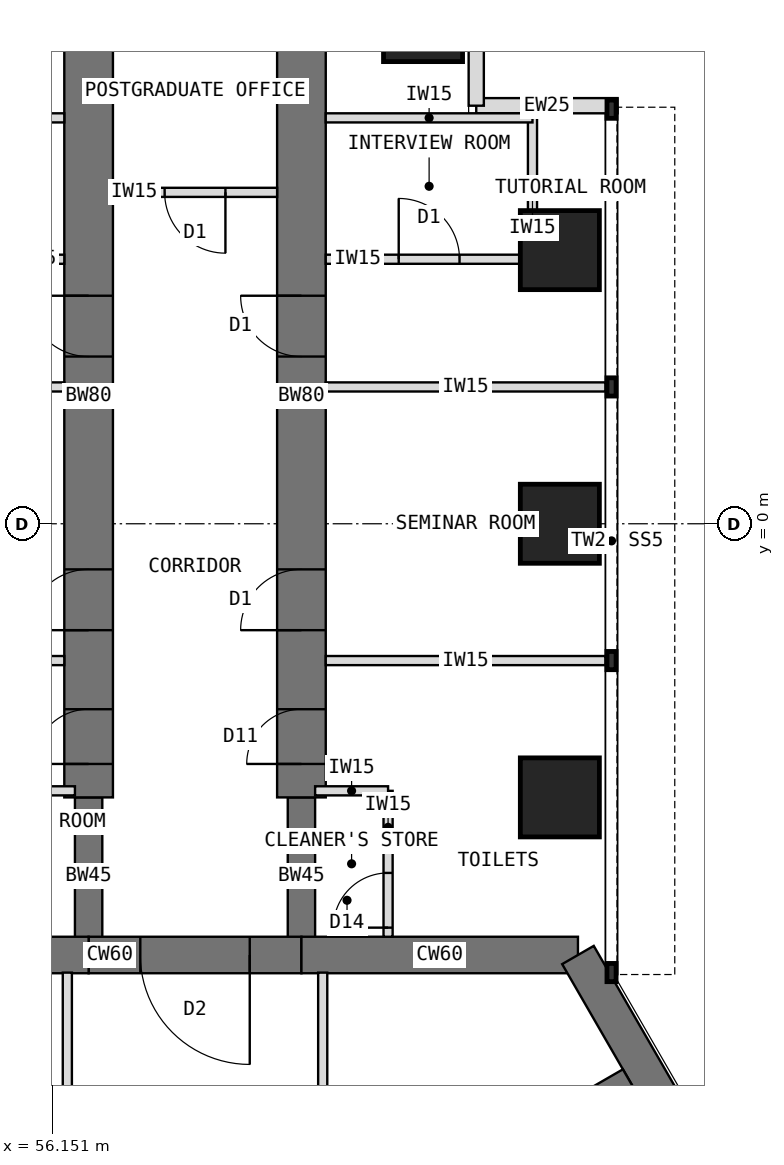
"""IFC4 building model, lengths in metres.
Left out: names, types, materials, properties, quantities, classifications, styles, units other than length and angle.
Written with IfcOpenShell. Run it as: python <this file> out.ifc"""

import sys

from ifc_helpers import new_model, si_unit, direction, frame, frame_2d, origin, origin_2d, place, context, subcontext, project, spatial, rectangle, extrude, element, fill, save


model = new_model("IFC4")
c1 = context("Model", 3, precision=1e-05, world=origin(), true_north=direction((0.0, 1.0)))
c2 = subcontext(c1, "Body", "Model", "MODEL_VIEW")
j1 = project(units=[si_unit("LENGTHUNIT", "METRE"), si_unit("PLANEANGLEUNIT", "RADIAN")], contexts=[c1])
p1 = place(None, origin())
s1 = spatial("IfcSite", under=j1, at=p1, CompositionType="ELEMENT")
p2 = place(p1, origin())
s2 = spatial("IfcBuilding", under=s1, at=p2, CompositionType="ELEMENT")
p3 = place(p2, frame((0.0, 0.0, 133.5)))
s3 = spatial("IfcBuildingStorey", under=s2, at=p3, CompositionType="ELEMENT", Elevation=133.5)
p4 = place(p3, frame((64.798, -7.092, 0.0), z_axis=(0.0, 0.0, 1.0), x_axis=(-1.0, 0.0, 0.0)))
e1 = element("IfcWall", 1, at=p4, inside=s3, PredefinedType="SHEAR", context=c2, shape_type="SweptSolid", body=[
    extrude(rectangle(XDim=4.548, YDim=0.6, at=frame_2d((2.274, 0.0))), origin(), (0.0, 0.0, 1.0), 4.0),
])
p5 = place(p3, frame((60.25, -7.092, 0.0), z_axis=(0.0, 0.0, 1.0), x_axis=(-1.0, 0.0, 0.0)))
e2 = element("IfcWall", 2, at=p5, inside=s3, PredefinedType="SHEAR", context=c2, shape_type="SweptSolid", body=[
    extrude(rectangle(XDim=3.5, YDim=0.6, at=frame_2d((1.75, 0.0))), origin(), (0.0, 0.0, 1.0), 4.0),
])
p6 = place(p5, frame((0.85, 0.0, 0.0)))
e3 = element("IfcOpeningElement", 3, at=p6, cuts=e2, PredefinedType="OPENING", context=c2, shape_type="SweptSolid", body=[
    extrude(rectangle(XDim=1.8, YDim=2.1, at=frame_2d((0.9, 1.05))), frame((0.0, 0.31, 0.0), z_axis=(0.0, -1.0, 0.0), x_axis=(1.0, 0.0, 0.0)), (0.0, 0.0, 1.0), 0.62),
])
p7 = place(p3, frame((56.75, -7.092, 0.0), z_axis=(0.0, 0.0, 1.0), x_axis=(-1.0, 0.0, 0.0)))
e4 = element("IfcWall", 4, at=p7, inside=s3, PredefinedType="SHEAR", context=c2, shape_type="SweptSolid", body=[
    extrude(rectangle(XDim=4.548, YDim=0.6, at=frame_2d((2.274, 0.0))), origin(), (0.0, 0.0, 1.0), 4.0),
])
p8 = place(p3, frame((71.096, -18.0, 0.0), z_axis=(0.0, 0.0, 1.0), x_axis=(-0.500005998175, 0.866021940709, 0.0)))
e5 = element("IfcWall", 5, at=p8, inside=s3, PredefinedType="SHEAR", context=c2, shape_type="SweptSolid", body=[
    extrude(rectangle(XDim=12.596, YDim=0.6, at=frame_2d((6.298, 0.0))), origin(), (0.0, 0.0, 1.0), 4.0),
])
p9 = place(p3, frame((56.75, -7.092, 0.0), z_axis=(0.0, 0.0, 1.0), x_axis=(0.0, 1.0, 0.0)))
e6 = element("IfcWall", 6, at=p9, inside=s3, PredefinedType="SHEAR", context=c2, shape_type="SweptSolid", body=[
    extrude(rectangle(XDim=2.592, YDim=0.45, at=frame_2d((1.296, 0.0))), origin(), (0.0, 0.0, 1.0), 4.0),
])
p10 = place(p3, frame((56.75, -4.5, 0.0), z_axis=(0.0, 0.0, 1.0), x_axis=(0.0, 1.0, 0.0)))
e7 = element("IfcWall", 7, at=p10, inside=s3, PredefinedType="SHEAR", context=c2, shape_type="SweptSolid", body=[
    extrude(rectangle(XDim=13.2, YDim=0.8, at=frame_2d((6.6, 0.0))), origin(), (0.0, 0.0, 1.0), 4.0),
])
p11 = place(p10, frame((0.55, 0.0, 0.0)))
e8 = element("IfcOpeningElement", 8, at=p11, cuts=e7, PredefinedType="OPENING", context=c2, shape_type="SweptSolid", body=[
    extrude(rectangle(XDim=0.9, YDim=2.1, at=frame_2d((0.45, 1.05))), frame((0.0, 0.41, 0.0), z_axis=(0.0, -1.0, 0.0), x_axis=(1.0, 0.0, 0.0)), (0.0, 0.0, 1.0), 0.82),
])
p12 = place(p10, frame((2.75, 0.0, 0.0)))
e9 = element("IfcOpeningElement", 9, at=p12, cuts=e7, PredefinedType="OPENING", context=c2, shape_type="SweptSolid", body=[
    extrude(rectangle(XDim=1.0, YDim=2.1, at=frame_2d((0.5, 1.05))), frame((0.0, 0.41, 0.0), z_axis=(0.0, -1.0, 0.0), x_axis=(1.0, 0.0, 0.0)), (0.0, 0.0, 1.0), 0.82),
])
p13 = place(p10, frame((7.25, 0.0, 0.0)))
e10 = element("IfcOpeningElement", 10, at=p13, cuts=e7, PredefinedType="OPENING", context=c2, shape_type="SweptSolid", body=[
    extrude(rectangle(XDim=1.0, YDim=2.1, at=frame_2d((0.5, 1.05))), frame((0.0, 0.41, 0.0), z_axis=(0.0, -1.0, 0.0), x_axis=(1.0, 0.0, 0.0)), (0.0, 0.0, 1.0), 0.82),
])
p14 = place(p3, frame((60.25, -7.092, 0.0), z_axis=(0.0, 0.0, 1.0), x_axis=(0.0, 1.0, 0.0)))
e11 = element("IfcWall", 11, at=p14, inside=s3, PredefinedType="SHEAR", context=c2, shape_type="SweptSolid", body=[
    extrude(rectangle(XDim=2.592, YDim=0.45, at=frame_2d((1.296, 0.0))), origin(), (0.0, 0.0, 1.0), 4.0),
])
p15 = place(p3, frame((60.25, -4.5, 0.0), z_axis=(0.0, 0.0, 1.0), x_axis=(0.0, 1.0, 0.0)))
e12 = element("IfcWall", 12, at=p15, inside=s3, PredefinedType="SHEAR", context=c2, shape_type="SweptSolid", body=[
    extrude(rectangle(XDim=13.2, YDim=0.8, at=frame_2d((6.6, 0.0))), origin(), (0.0, 0.0, 1.0), 4.0),
])
p16 = place(p15, frame((0.55, 0.0, 0.0)))
e13 = element("IfcOpeningElement", 13, at=p16, cuts=e12, PredefinedType="OPENING", context=c2, shape_type="SweptSolid", body=[
    extrude(rectangle(XDim=0.9, YDim=2.1, at=frame_2d((0.45, 1.05))), frame((0.0, 0.41, 0.0), z_axis=(0.0, -1.0, 0.0), x_axis=(1.0, 0.0, 0.0)), (0.0, 0.0, 1.0), 0.82),
])
p17 = place(p15, frame((2.75, 0.0, 0.0)))
e14 = element("IfcOpeningElement", 14, at=p17, cuts=e12, PredefinedType="OPENING", context=c2, shape_type="SweptSolid", body=[
    extrude(rectangle(XDim=1.0, YDim=2.1, at=frame_2d((0.5, 1.05))), frame((0.0, 0.41, 0.0), z_axis=(0.0, -1.0, 0.0), x_axis=(1.0, 0.0, 0.0)), (0.0, 0.0, 1.0), 0.82),
])
p18 = place(p15, frame((7.25, 0.0, 0.0)))
e15 = element("IfcOpeningElement", 15, at=p18, cuts=e12, PredefinedType="OPENING", context=c2, shape_type="SweptSolid", body=[
    extrude(rectangle(XDim=1.0, YDim=2.1, at=frame_2d((0.5, 1.05))), frame((0.0, 0.41, 0.0), z_axis=(0.0, -1.0, 0.0), x_axis=(1.0, 0.0, 0.0)), (0.0, 0.0, 1.0), 0.82),
])
for number, where, z_axis, x_axis in (
    (16, (64.5, -4.5, 0.0), (0.0, 0.0, 1.0), (1.0, 0.0, 0.0)),
    (17, (64.5, 0.0, 0.0), (0.0, 0.0, 1.0), (1.0, 0.0, 0.0)),
    (18, (64.5, 4.5, 0.0), (0.0, 0.0, 1.0), (1.0, 0.0, 0.0)),
    (19, (62.25, 8.25, 0.0), (0.0, 0.0, 1.0), (1.0, 0.0, 0.0)),
):
    element("IfcColumn", number, at=place(p3, frame(where, z_axis=z_axis, x_axis=x_axis)), inside=s3, PredefinedType="COLUMN", context=c2, shape_type="SweptSolid", body=[
        extrude(rectangle(XDim=1.3, YDim=1.3, at=origin_2d()), origin(), (0.0, 0.0, 1.0), 4.0),
    ])
for number, where, z_axis, x_axis in (
    (20, (65.45, 6.875, 0.0), (0.0, 0.0, 1.0), (-1.0, 0.0, 0.0)),
    (21, (63.125, 6.875, 0.0), (0.0, 0.0, 1.0), (0.0, 1.0, 0.0)),
):
    element("IfcWall", number, at=place(p3, frame(where, z_axis=z_axis, x_axis=x_axis)), inside=s3, PredefinedType="STANDARD", context=c2, shape_type="SweptSolid", body=[
        extrude(rectangle(XDim=2.325, YDim=0.25, at=frame_2d((1.163, 0.0))), origin(), (0.0, 0.0, 1.0), 3.8),
    ])
for number, where, z_axis, x_axis in (
    (22, (56.48, -12.099, 0.0), (0.0, 0.0, 1.0), (-0.866, 0.5, 0.0)),
    (23, (60.52, -12.099, 0.0), (0.0, 0.0, 1.0), (0.866, 0.5, 0.0)),
):
    element("IfcWall", number, at=place(p3, frame(where, z_axis=z_axis, x_axis=x_axis)), inside=s3, PredefinedType="SHEAR", context=c2, shape_type="SweptSolid", body=[
        extrude(rectangle(XDim=5.908, YDim=0.4, at=frame_2d((2.954, 0.0))), origin(), (0.0, 0.0, 1.0), 4.0),
    ])
for number, where, z_axis, x_axis in (
    (24, (56.35, -2.25, 0.0), (0.0, 0.0, 1.0), (-1.0, 0.0, 0.0)),
    (25, (56.35, 2.25, 0.0), (0.0, 0.0, 1.0), (-1.0, 0.0, 0.0)),
):
    element("IfcWall", number, at=place(p3, frame(where, z_axis=z_axis, x_axis=x_axis)), inside=s3, PredefinedType="PARTITIONING", context=c2, shape_type="SweptSolid", body=[
        extrude(rectangle(XDim=4.6, YDim=0.15, at=frame_2d((2.3, 0.0))), origin(), (0.0, 0.0, 1.0), 3.8),
    ])
p19 = place(p3, frame((56.35, 4.35, 0.0), z_axis=(0.0, 0.0, 1.0), x_axis=(-1.0, 0.0, 0.0)))
e26 = element("IfcWall", 26, at=p19, inside=s3, PredefinedType="PARTITIONING", context=c2, shape_type="SweptSolid", body=[
    extrude(rectangle(XDim=3.4, YDim=0.15, at=frame_2d((1.7, 0.0))), origin(), (0.0, 0.0, 1.0), 3.8),
])
p20 = place(p19, frame((1.2, 0.0, 0.0)))
e27 = element("IfcOpeningElement", 27, at=p20, cuts=e26, PredefinedType="OPENING", context=c2, shape_type="SweptSolid", body=[
    extrude(rectangle(XDim=1.0, YDim=2.1, at=frame_2d((0.5, 1.05))), frame((0.0, 0.085, 0.0), z_axis=(0.0, -1.0, 0.0), x_axis=(1.0, 0.0, 0.0)), (0.0, 0.0, 1.0), 0.17),
])
p21 = place(p3, frame((56.35, 6.675, 0.0), z_axis=(0.0, 0.0, 1.0), x_axis=(-1.0, 0.0, 0.0)))
e28 = element("IfcWall", 28, at=p21, inside=s3, PredefinedType="PARTITIONING", context=c2, shape_type="SweptSolid", body=[
    extrude(rectangle(XDim=3.4, YDim=0.15, at=frame_2d((1.7, 0.0))), origin(), (0.0, 0.0, 1.0), 3.8),
])
p22 = place(p3, frame((56.525, -4.392, 0.0), z_axis=(0.0, 0.0, 1.0), x_axis=(-1.0, 0.0, 0.0)))
e29 = element("IfcWall", 29, at=p22, inside=s3, PredefinedType="PARTITIONING", context=c2, shape_type="SweptSolid", body=[
    extrude(rectangle(XDim=3.2, YDim=0.15, at=frame_2d((1.6, 0.0))), origin(), (0.0, 0.0, 1.0), 3.8),
])
for number, where, z_axis, x_axis in (
    (30, (60.65, -2.25, 0.0), (0.0, 0.0, 1.0), (1.0, 0.0, 0.0)),
    (31, (60.65, 2.25, 0.0), (0.0, 0.0, 1.0), (1.0, 0.0, 0.0)),
):
    element("IfcWall", number, at=place(p3, frame(where, z_axis=z_axis, x_axis=x_axis)), inside=s3, PredefinedType="PARTITIONING", context=c2, shape_type="SweptSolid", body=[
        extrude(rectangle(XDim=4.6, YDim=0.15, at=frame_2d((2.3, 0.0))), origin(), (0.0, 0.0, 1.0), 3.8),
    ])
p23 = place(p3, frame((64.05, 4.35, 0.0), z_axis=(0.0, 0.0, 1.0), x_axis=(0.0, 1.0, 0.0)))
e32 = element("IfcWall", 32, at=p23, inside=s3, PredefinedType="PARTITIONING", context=c2, shape_type="SweptSolid", body=[
    extrude(rectangle(XDim=2.4, YDim=0.15, at=frame_2d((1.2, 0.0))), origin(), (0.0, 0.0, 1.0), 3.8),
])
p24 = place(p3, frame((60.65, 4.35, 0.0), z_axis=(0.0, 0.0, 1.0), x_axis=(1.0, 0.0, 0.0)))
e33 = element("IfcWall", 33, at=p24, inside=s3, PredefinedType="PARTITIONING", context=c2, shape_type="SweptSolid", body=[
    extrude(rectangle(XDim=3.4, YDim=0.15, at=frame_2d((1.7, 0.0))), origin(), (0.0, 0.0, 1.0), 3.8),
])
p25 = place(p24, frame((1.2, 0.0, 0.0)))
e34 = element("IfcOpeningElement", 34, at=p25, cuts=e33, PredefinedType="OPENING", context=c2, shape_type="SweptSolid", body=[
    extrude(rectangle(XDim=1.0, YDim=2.1, at=frame_2d((0.5, 1.05))), frame((0.0, 0.085, 0.0), z_axis=(0.0, -1.0, 0.0), x_axis=(1.0, 0.0, 0.0)), (0.0, 0.0, 1.0), 0.17),
])
p26 = place(p3, frame((60.65, 6.675, 0.0), z_axis=(0.0, 0.0, 1.0), x_axis=(1.0, 0.0, 0.0)))
e35 = element("IfcWall", 35, at=p26, inside=s3, PredefinedType="PARTITIONING", context=c2, shape_type="SweptSolid", body=[
    extrude(rectangle(XDim=3.4, YDim=0.15, at=frame_2d((1.7, 0.0))), origin(), (0.0, 0.0, 1.0), 3.8),
])
p27 = place(p3, frame((61.675, -6.792, 0.0), z_axis=(0.0, 0.0, 1.0), x_axis=(0.0, 1.0, 0.0)))
e36 = element("IfcWall", 36, at=p27, inside=s3, PredefinedType="PARTITIONING", context=c2, shape_type="SweptSolid", body=[
    extrude(rectangle(XDim=2.4, YDim=0.15, at=frame_2d((1.2, 0.0))), origin(), (0.0, 0.0, 1.0), 3.8),
])
p28 = place(p27, frame((0.15, 0.0, 0.0)))
e37 = element("IfcOpeningElement", 37, at=p28, cuts=e36, PredefinedType="OPENING", context=c2, shape_type="SweptSolid", body=[
    extrude(rectangle(XDim=0.9, YDim=2.1, at=frame_2d((0.45, 1.05))), frame((0.0, 0.085, 0.0), z_axis=(0.0, -1.0, 0.0), x_axis=(1.0, 0.0, 0.0)), (0.0, 0.0, 1.0), 0.17),
])
p29 = place(p3, frame((60.475, -4.392, 0.0), z_axis=(0.0, 0.0, 1.0), x_axis=(1.0, 0.0, 0.0)))
e38 = element("IfcWall", 38, at=p29, inside=s3, PredefinedType="PARTITIONING", context=c2, shape_type="SweptSolid", body=[
    extrude(rectangle(XDim=1.2, YDim=0.15, at=frame_2d((0.6, 0.0))), origin(), (0.0, 0.0, 1.0), 3.8),
])
p30 = place(p3, frame((56.4, -11.857, 0.0), z_axis=(0.0, 0.0, 1.0), x_axis=(0.0, 1.0, 0.0)))
e39 = element("IfcWall", 39, at=p30, inside=s3, PredefinedType="PARTITIONING", context=c2, shape_type="SweptSolid", body=[
    extrude(rectangle(XDim=4.476, YDim=0.15, at=frame_2d((2.238, 0.0))), origin(), (0.0, 0.0, 1.0), 3.8),
])
p31 = place(p30, frame((0.843, 0.0, 0.0)))
e40 = element("IfcOpeningElement", 40, at=p31, cuts=e39, PredefinedType="OPENING", context=c2, shape_type="SweptSolid", body=[
    extrude(rectangle(XDim=1.0, YDim=2.1, at=frame_2d((0.5, 1.05))), frame((0.0, 0.085, 0.0), z_axis=(0.0, -1.0, 0.0), x_axis=(1.0, 0.0, 0.0)), (0.0, 0.0, 1.0), 0.17),
])
p32 = place(p3, frame((60.6, -7.382, 0.0), z_axis=(0.0, 0.0, 1.0), x_axis=(0.0, -1.0, 0.0)))
e41 = element("IfcWall", 41, at=p32, inside=s3, PredefinedType="PARTITIONING", context=c2, shape_type="SweptSolid", body=[
    extrude(rectangle(XDim=4.476, YDim=0.15, at=frame_2d((2.238, 0.0))), origin(), (0.0, 0.0, 1.0), 3.8),
])
p33 = place(p32, frame((2.633, 0.0, 0.0)))
e42 = element("IfcOpeningElement", 42, at=p33, cuts=e41, PredefinedType="OPENING", context=c2, shape_type="SweptSolid", body=[
    extrude(rectangle(XDim=1.0, YDim=2.1, at=frame_2d((0.5, 1.05))), frame((0.0, 0.085, 0.0), z_axis=(0.0, -1.0, 0.0), x_axis=(1.0, 0.0, 0.0)), (0.0, 0.0, 1.0), 0.17),
])
p34 = place(p3, frame((59.85, 5.45, 0.0), z_axis=(0.0, 0.0, 1.0), x_axis=(-1.0, 0.0, 0.0)))
e43 = element("IfcWall", 43, at=p34, inside=s3, PredefinedType="PARTITIONING", context=c2, shape_type="SweptSolid", body=[
    extrude(rectangle(XDim=2.7, YDim=0.15, at=frame_2d((1.35, 0.0))), origin(), (0.0, 0.0, 1.0), 3.8),
])
p35 = place(p34, frame((0.85, 0.0, 0.0)))
e44 = element("IfcOpeningElement", 44, at=p35, cuts=e43, PredefinedType="OPENING", context=c2, shape_type="SweptSolid", body=[
    extrude(rectangle(XDim=1.0, YDim=2.1, at=frame_2d((0.5, 1.05))), frame((0.0, 0.085, 0.0), z_axis=(0.0, -1.0, 0.0), x_axis=(1.0, 0.0, 0.0)), (0.0, 0.0, 1.0), 0.17),
])
p36 = place(p6, origin())
e45 = element("IfcDoor", 45, at=p36, inside=s3, OperationType="DOUBLE_DOOR_DOUBLE_SWING", PredefinedType="DOOR", context=c2, shape_type="SweptSolid", body=[
    extrude(rectangle(XDim=1.72, YDim=2.06, at=frame_2d((0.9, 1.03))), frame((0.0, 0.025, 0.0), z_axis=(0.0, -1.0, 0.0), x_axis=(1.0, 0.0, 0.0)), (0.0, 0.0, 1.0), 0.05),
    extrude(rectangle(XDim=0.04, YDim=2.1, at=frame_2d((0.02, 1.05))), frame((0.0, 0.3, 0.0), z_axis=(0.0, -1.0, 0.0), x_axis=(1.0, 0.0, 0.0)), (0.0, 0.0, 1.0), 0.6),
    extrude(rectangle(XDim=0.04, YDim=2.1, at=frame_2d((1.78, 1.05))), frame((0.0, 0.3, 0.0), z_axis=(0.0, -1.0, 0.0), x_axis=(1.0, 0.0, 0.0)), (0.0, 0.0, 1.0), 0.6),
    extrude(rectangle(XDim=1.72, YDim=0.04, at=frame_2d((0.9, 2.08))), frame((0.0, 0.3, 0.0), z_axis=(0.0, -1.0, 0.0), x_axis=(1.0, 0.0, 0.0)), (0.0, 0.0, 1.0), 0.6),
])
fill(e3, e45)
p37 = place(p25, origin())
e46 = element("IfcDoor", 46, at=p37, inside=s3, OperationType="SINGLE_SWING_LEFT", PredefinedType="DOOR", context=c2, shape_type="SweptSolid", body=[
    extrude(rectangle(XDim=1.0, YDim=2.1, at=frame_2d((0.5, 1.05))), frame((0.0, 0.025, 0.0), z_axis=(0.0, -1.0, 0.0), x_axis=(1.0, 0.0, 0.0)), (0.0, 0.0, 1.0), 0.05),
])
fill(e34, e46)
p38 = place(p28, origin())
e47 = element("IfcDoor", 47, at=p38, inside=s3, OperationType="SINGLE_SWING_LEFT", PredefinedType="DOOR", context=c2, shape_type="SweptSolid", body=[
    extrude(rectangle(XDim=0.9, YDim=2.1, at=frame_2d((0.45, 1.05))), frame((0.0, 0.025, 0.0), z_axis=(0.0, -1.0, 0.0), x_axis=(1.0, 0.0, 0.0)), (0.0, 0.0, 1.0), 0.05),
])
fill(e37, e47)
p39 = place(p35, origin())
e48 = element("IfcDoor", 48, at=p39, inside=s3, OperationType="SINGLE_SWING_LEFT", PredefinedType="DOOR", context=c2, shape_type="SweptSolid", body=[
    extrude(rectangle(XDim=1.0, YDim=2.1, at=frame_2d((0.5, 1.05))), frame((0.0, 0.025, 0.0), z_axis=(0.0, -1.0, 0.0), x_axis=(1.0, 0.0, 0.0)), (0.0, 0.0, 1.0), 0.05),
])
fill(e44, e48)
p40 = place(p11, origin())
e49 = element("IfcDoor", 49, at=p40, inside=s3, OperationType="SINGLE_SWING_LEFT", PredefinedType="DOOR", context=c2, shape_type="SweptSolid", body=[
    extrude(rectangle(XDim=0.82, YDim=2.06, at=frame_2d((0.45, 1.03))), frame((0.0, 0.025, 0.0), z_axis=(0.0, -1.0, 0.0), x_axis=(1.0, 0.0, 0.0)), (0.0, 0.0, 1.0), 0.05),
    extrude(rectangle(XDim=0.04, YDim=2.1, at=frame_2d((0.02, 1.05))), frame((0.0, 0.4, 0.0), z_axis=(0.0, -1.0, 0.0), x_axis=(1.0, 0.0, 0.0)), (0.0, 0.0, 1.0), 0.8),
    extrude(rectangle(XDim=0.04, YDim=2.1, at=frame_2d((0.88, 1.05))), frame((0.0, 0.4, 0.0), z_axis=(0.0, -1.0, 0.0), x_axis=(1.0, 0.0, 0.0)), (0.0, 0.0, 1.0), 0.8),
    extrude(rectangle(XDim=0.82, YDim=0.04, at=frame_2d((0.45, 2.08))), frame((0.0, 0.4, 0.0), z_axis=(0.0, -1.0, 0.0), x_axis=(1.0, 0.0, 0.0)), (0.0, 0.0, 1.0), 0.8),
])
fill(e8, e49)
p41 = place(p12, origin())
e50 = element("IfcDoor", 50, at=p41, inside=s3, OperationType="SINGLE_SWING_LEFT", PredefinedType="DOOR", context=c2, shape_type="SweptSolid", body=[
    extrude(rectangle(XDim=0.92, YDim=2.06, at=frame_2d((0.5, 1.03))), frame((0.0, 0.025, 0.0), z_axis=(0.0, -1.0, 0.0), x_axis=(1.0, 0.0, 0.0)), (0.0, 0.0, 1.0), 0.05),
    extrude(rectangle(XDim=0.04, YDim=2.1, at=frame_2d((0.02, 1.05))), frame((0.0, 0.4, 0.0), z_axis=(0.0, -1.0, 0.0), x_axis=(1.0, 0.0, 0.0)), (0.0, 0.0, 1.0), 0.8),
    extrude(rectangle(XDim=0.04, YDim=2.1, at=frame_2d((0.98, 1.05))), frame((0.0, 0.4, 0.0), z_axis=(0.0, -1.0, 0.0), x_axis=(1.0, 0.0, 0.0)), (0.0, 0.0, 1.0), 0.8),
    extrude(rectangle(XDim=0.92, YDim=0.04, at=frame_2d((0.5, 2.08))), frame((0.0, 0.4, 0.0), z_axis=(0.0, -1.0, 0.0), x_axis=(1.0, 0.0, 0.0)), (0.0, 0.0, 1.0), 0.8),
])
fill(e9, e50)
p42 = place(p13, origin())
e51 = element("IfcDoor", 51, at=p42, inside=s3, OperationType="SINGLE_SWING_RIGHT", PredefinedType="DOOR", context=c2, shape_type="SweptSolid", body=[
    extrude(rectangle(XDim=0.92, YDim=2.06, at=frame_2d((0.5, 1.03))), frame((0.0, 0.025, 0.0), z_axis=(0.0, -1.0, 0.0), x_axis=(1.0, 0.0, 0.0)), (0.0, 0.0, 1.0), 0.05),
    extrude(rectangle(XDim=0.04, YDim=2.1, at=frame_2d((0.02, 1.05))), frame((0.0, 0.4, 0.0), z_axis=(0.0, -1.0, 0.0), x_axis=(1.0, 0.0, 0.0)), (0.0, 0.0, 1.0), 0.8),
    extrude(rectangle(XDim=0.04, YDim=2.1, at=frame_2d((0.98, 1.05))), frame((0.0, 0.4, 0.0), z_axis=(0.0, -1.0, 0.0), x_axis=(1.0, 0.0, 0.0)), (0.0, 0.0, 1.0), 0.8),
    extrude(rectangle(XDim=0.92, YDim=0.04, at=frame_2d((0.5, 2.08))), frame((0.0, 0.4, 0.0), z_axis=(0.0, -1.0, 0.0), x_axis=(1.0, 0.0, 0.0)), (0.0, 0.0, 1.0), 0.8),
])
fill(e10, e51)
p43 = place(p16, origin())
e52 = element("IfcDoor", 52, at=p43, inside=s3, OperationType="SINGLE_SWING_LEFT", PredefinedType="DOOR", context=c2, shape_type="SweptSolid", body=[
    extrude(rectangle(XDim=0.82, YDim=2.06, at=frame_2d((0.45, 1.03))), frame((0.0, 0.025, 0.0), z_axis=(0.0, -1.0, 0.0), x_axis=(1.0, 0.0, 0.0)), (0.0, 0.0, 1.0), 0.05),
    extrude(rectangle(XDim=0.04, YDim=2.1, at=frame_2d((0.02, 1.05))), frame((0.0, 0.4, 0.0), z_axis=(0.0, -1.0, 0.0), x_axis=(1.0, 0.0, 0.0)), (0.0, 0.0, 1.0), 0.8),
    extrude(rectangle(XDim=0.04, YDim=2.1, at=frame_2d((0.88, 1.05))), frame((0.0, 0.4, 0.0), z_axis=(0.0, -1.0, 0.0), x_axis=(1.0, 0.0, 0.0)), (0.0, 0.0, 1.0), 0.8),
    extrude(rectangle(XDim=0.82, YDim=0.04, at=frame_2d((0.45, 2.08))), frame((0.0, 0.4, 0.0), z_axis=(0.0, -1.0, 0.0), x_axis=(1.0, 0.0, 0.0)), (0.0, 0.0, 1.0), 0.8),
])
fill(e13, e52)
p44 = place(p17, origin())
e53 = element("IfcDoor", 53, at=p44, inside=s3, OperationType="SINGLE_SWING_LEFT", PredefinedType="DOOR", context=c2, shape_type="SweptSolid", body=[
    extrude(rectangle(XDim=0.92, YDim=2.06, at=frame_2d((0.5, 1.03))), frame((0.0, 0.025, 0.0), z_axis=(0.0, -1.0, 0.0), x_axis=(1.0, 0.0, 0.0)), (0.0, 0.0, 1.0), 0.05),
    extrude(rectangle(XDim=0.04, YDim=2.1, at=frame_2d((0.02, 1.05))), frame((0.0, 0.4, 0.0), z_axis=(0.0, -1.0, 0.0), x_axis=(1.0, 0.0, 0.0)), (0.0, 0.0, 1.0), 0.8),
    extrude(rectangle(XDim=0.04, YDim=2.1, at=frame_2d((0.98, 1.05))), frame((0.0, 0.4, 0.0), z_axis=(0.0, -1.0, 0.0), x_axis=(1.0, 0.0, 0.0)), (0.0, 0.0, 1.0), 0.8),
    extrude(rectangle(XDim=0.92, YDim=0.04, at=frame_2d((0.5, 2.08))), frame((0.0, 0.4, 0.0), z_axis=(0.0, -1.0, 0.0), x_axis=(1.0, 0.0, 0.0)), (0.0, 0.0, 1.0), 0.8),
])
fill(e14, e53)
p45 = place(p18, origin())
e54 = element("IfcDoor", 54, at=p45, inside=s3, OperationType="SINGLE_SWING_RIGHT", PredefinedType="DOOR", context=c2, shape_type="SweptSolid", body=[
    extrude(rectangle(XDim=0.92, YDim=2.06, at=frame_2d((0.5, 1.03))), frame((0.0, 0.025, 0.0), z_axis=(0.0, -1.0, 0.0), x_axis=(1.0, 0.0, 0.0)), (0.0, 0.0, 1.0), 0.05),
    extrude(rectangle(XDim=0.04, YDim=2.1, at=frame_2d((0.02, 1.05))), frame((0.0, 0.4, 0.0), z_axis=(0.0, -1.0, 0.0), x_axis=(1.0, 0.0, 0.0)), (0.0, 0.0, 1.0), 0.8),
    extrude(rectangle(XDim=0.04, YDim=2.1, at=frame_2d((0.98, 1.05))), frame((0.0, 0.4, 0.0), z_axis=(0.0, -1.0, 0.0), x_axis=(1.0, 0.0, 0.0)), (0.0, 0.0, 1.0), 0.8),
    extrude(rectangle(XDim=0.92, YDim=0.04, at=frame_2d((0.5, 2.08))), frame((0.0, 0.4, 0.0), z_axis=(0.0, -1.0, 0.0), x_axis=(1.0, 0.0, 0.0)), (0.0, 0.0, 1.0), 0.8),
])
fill(e15, e54)
save(model, sys.argv[1])
